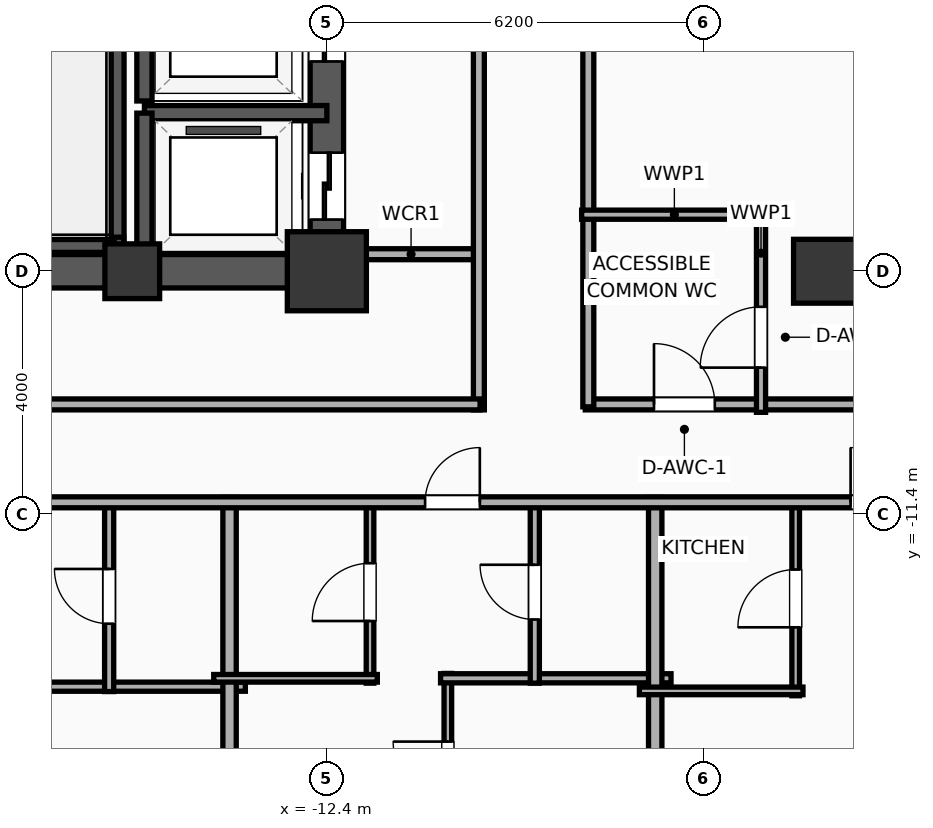
"""IFC4 building model, lengths in metres.
Left out: names, types, materials, properties, quantities, classifications, styles, units other than length and angle.
Written with IfcOpenShell. Run it as: python <this file> out.ifc"""

import sys

from ifc_helpers import new_model, si_unit, direction, frame, frame_2d, origin, origin_2d, place, context, subcontext, project, spatial, rectangle, extrude, element, fill, save


model = new_model("IFC4")
c1 = context("Model", 3, precision=1e-05, world=origin(), true_north=direction((0.0, 1.0)))
c2 = subcontext(c1, "Body", "Model", "MODEL_VIEW")
j1 = project(units=[si_unit("LENGTHUNIT", "METRE"), si_unit("PLANEANGLEUNIT", "RADIAN")], contexts=[c1])
p1 = place(None, origin())
s1 = spatial("IfcSite", under=j1, at=p1, CompositionType="ELEMENT")
p2 = place(p1, origin())
s2 = spatial("IfcBuilding", under=s1, at=p2, CompositionType="ELEMENT")
p3 = place(p2, frame((0.0, 0.0, 120.9)))
s3 = spatial("IfcBuildingStorey", under=s2, at=p3, CompositionType="ELEMENT", Elevation=120.9)
p4 = place(p3, frame((-15.6, -7.4, 0.0), z_axis=(0.0, 0.0, 1.0), x_axis=(1.0, 0.0, 0.0)))
e1 = element("IfcColumn", 1, at=p4, inside=s3, PredefinedType="COLUMN", context=c2, shape_type="SweptSolid", body=[
    extrude(rectangle(XDim=0.9, YDim=0.9, at=origin_2d()), origin(), (0.0, 0.0, 1.0), 3.9),
])
p5 = place(p3, frame((-12.4, -7.4, 0.0), z_axis=(0.0, 0.0, 1.0), x_axis=(1.0, 0.0, 0.0)))
e2 = element("IfcColumn", 2, at=p5, inside=s3, PredefinedType="COLUMN", context=c2, shape_type="SweptSolid", body=[
    extrude(rectangle(XDim=1.3, YDim=1.3, at=origin_2d()), origin(), (0.0, 0.0, 1.0), 3.9),
])
p6 = place(p3, frame((-19.475, -7.4, 0.0), z_axis=(0.0, 0.0, 1.0), x_axis=(1.0, 0.0, 0.0)))
e3 = element("IfcWall", 3, at=p6, inside=s3, PredefinedType="SHEAR", context=c2, shape_type="SweptSolid", body=[
    extrude(rectangle(XDim=7.35, YDim=0.55, at=frame_2d((3.675, 0.0))), origin(), (0.0, 0.0, 1.0), 3.65),
])
p7 = place(p3, frame((-12.4, -7.4, 0.0), z_axis=(0.0, 0.0, 1.0), x_axis=(0.0, 1.0, 0.0)))
e4 = element("IfcWall", 4, at=p7, inside=s3, PredefinedType="SHEAR", context=c2, shape_type="SweptSolid", body=[
    extrude(rectangle(XDim=14.8, YDim=0.55, at=frame_2d((7.4, 0.0))), origin(), (0.0, 0.0, 1.0), 3.65),
])
p8 = place(p7, frame((0.85, 0.0, 0.0)))
e5 = element("IfcOpeningElement", 5, at=p8, cuts=e4, PredefinedType="OPENING", context=c2, shape_type="SweptSolid", body=[
    extrude(rectangle(XDim=1.1, YDim=2.05, at=frame_2d((0.55, 1.025))), frame((0.0, 0.285, 0.0), z_axis=(0.0, -1.0, 0.0), x_axis=(1.0, 0.0, 0.0)), (0.0, 0.0, 1.0), 0.57),
])
p9 = place(p7, frame((3.45, 0.0, 0.0)))
e6 = element("IfcOpeningElement", 6, at=p9, cuts=e4, PredefinedType="OPENING", context=c2, shape_type="SweptSolid", body=[
    extrude(rectangle(XDim=1.1, YDim=2.05, at=frame_2d((0.55, 1.025))), frame((0.0, 0.285, 0.0), z_axis=(0.0, -1.0, 0.0), x_axis=(1.0, 0.0, 0.0)), (0.0, 0.0, 1.0), 0.57),
])
p10 = place(p7, frame((10.53, 0.0, 0.0)))
e7 = element("IfcOpeningElement", 7, at=p10, cuts=e4, PredefinedType="OPENING", context=c2, shape_type="SweptSolid", body=[
    extrude(rectangle(XDim=1.1, YDim=2.05, at=frame_2d((0.55, 1.025))), frame((0.0, 0.285, 0.0), z_axis=(0.0, -1.0, 0.0), x_axis=(1.0, 0.0, 0.0)), (0.0, 0.0, 1.0), 0.57),
])
p11 = place(p3, frame((-15.86, -7.085, 0.0), z_axis=(0.0, 0.0, 1.0), x_axis=(0.0, 1.0, 0.0)))
e8 = element("IfcWall", 8, at=p11, inside=s3, PredefinedType="SOLIDWALL", context=c2, shape_type="SweptSolid", body=[
    extrude(rectangle(XDim=7.685, YDim=0.25, at=frame_2d((3.843, 0.0))), origin(), (0.0, 0.0, 1.0), 3.65),
])
p12 = place(p3, frame((-19.2, -6.965, 0.0), z_axis=(0.0, 0.0, 1.0), x_axis=(1.0, 0.0, 0.0)))
e9 = element("IfcWall", 9, at=p12, inside=s3, PredefinedType="SOLIDWALL", context=c2, shape_type="SweptSolid", body=[
    extrude(rectangle(XDim=3.46, YDim=0.25, at=frame_2d((1.73, 0.0))), origin(), (0.0, 0.0, 1.0), 3.65),
])
p13 = place(p3, frame((-4.2, -7.4, 0.0), z_axis=(0.0, 0.0, 1.0), x_axis=(1.0, 0.0, 0.0)))
e10 = element("IfcColumn", 10, at=p13, inside=s3, PredefinedType="COLUMN", context=c2, shape_type="SweptSolid", body=[
    extrude(rectangle(XDim=1.05, YDim=1.05, at=origin_2d()), origin(), (0.0, 0.0, 1.0), 3.9),
])
p14 = place(p3, frame((-12.4, -4.8, 0.0), z_axis=(0.0, 0.0, 1.0), x_axis=(-1.0, 0.0, 0.0)))
e11 = element("IfcWall", 11, at=p14, inside=s3, PredefinedType="SOLIDWALL", context=c2, shape_type="SweptSolid", body=[
    extrude(rectangle(XDim=3.0, YDim=0.25, at=frame_2d((1.5, 0.0))), origin(), (0.0, 0.0, 1.0), 3.65),
])
p15 = place(p3, frame((-15.4, -4.8, 0.0), z_axis=(0.0, 0.0, 1.0), x_axis=(0.0, -1.0, 0.0)))
e12 = element("IfcWall", 12, at=p15, inside=s3, PredefinedType="SOLIDWALL", context=c2, shape_type="SweptSolid", body=[
    extrude(rectangle(XDim=2.6, YDim=0.25, at=frame_2d((1.3, 0.0))), origin(), (0.0, 0.0, 1.0), 3.65),
])
p16 = place(p3, frame((-15.4, -2.2, 0.0), z_axis=(0.0, 0.0, 1.0), x_axis=(0.0, -1.0, 0.0)))
e13 = element("IfcWall", 13, at=p16, inside=s3, PredefinedType="SOLIDWALL", context=c2, shape_type="SweptSolid", body=[
    extrude(rectangle(XDim=2.4, YDim=0.25, at=frame_2d((1.2, 0.0))), origin(), (0.0, 0.0, 1.0), 3.65),
])
p17 = place(p3, frame((-12.15, -7.12, 0.0), z_axis=(0.0, 0.0, 1.0), x_axis=(1.0, 0.0, 0.0)))
e14 = element("IfcWall", 14, at=p17, inside=s3, PredefinedType="PARTITIONING", context=c2, shape_type="SweptSolid", body=[
    extrude(rectangle(XDim=2.27, YDim=0.18, at=frame_2d((1.135, 0.0))), origin(), (0.0, 0.0, 1.0), 3.65),
])
p18 = place(p3, frame((-9.9, -9.68, 0.0), z_axis=(0.0, 0.0, 1.0), x_axis=(0.0, 1.0, 0.0)))
e15 = element("IfcWall", 15, at=p18, inside=s3, PredefinedType="PARTITIONING", context=c2, shape_type="SweptSolid", body=[
    extrude(rectangle(XDim=19.36, YDim=0.18, at=frame_2d((9.68, 0.0))), origin(), (0.0, 0.0, 1.0), 3.65),
])
p19 = place(p18, frame((8.162, 0.0, 0.0)))
e16 = element("IfcOpeningElement", 16, at=p19, cuts=e15, PredefinedType="OPENING", context=c2, shape_type="SweptSolid", body=[
    extrude(rectangle(XDim=1.1, YDim=2.05, at=frame_2d((0.55, 1.025))), frame((0.0, 0.1, 0.0), z_axis=(0.0, -1.0, 0.0), x_axis=(1.0, 0.0, 0.0)), (0.0, 0.0, 1.0), 0.2),
])
p20 = place(p3, frame((-29.21, -9.59, 0.0), z_axis=(0.0, 0.0, 1.0), x_axis=(1.0, 0.0, 0.0)))
e17 = element("IfcWall", 17, at=p20, inside=s3, PredefinedType="PARTITIONING", context=c2, shape_type="SweptSolid", body=[
    extrude(rectangle(XDim=19.33, YDim=0.18, at=frame_2d((9.665, 0.0))), origin(), (0.0, 0.0, 1.0), 3.65),
])
p21 = place(p3, frame((-8.15, -9.59, 0.0), z_axis=(0.0, 0.0, 1.0), x_axis=(1.0, 0.0, 0.0)))
e18 = element("IfcWall", 18, at=p21, inside=s3, PredefinedType="PARTITIONING", context=c2, shape_type="SweptSolid", body=[
    extrude(rectangle(XDim=16.3, YDim=0.18, at=frame_2d((8.15, 0.0))), origin(), (0.0, 0.0, 1.0), 3.65),
])
p22 = place(p21, frame((1.13, 0.0, 0.0)))
e19 = element("IfcOpeningElement", 19, at=p22, cuts=e18, PredefinedType="OPENING", context=c2, shape_type="SweptSolid", body=[
    extrude(rectangle(XDim=1.0, YDim=2.05, at=frame_2d((0.5, 1.025))), frame((0.0, 0.1, 0.0), z_axis=(0.0, -1.0, 0.0), x_axis=(1.0, 0.0, 0.0)), (0.0, 0.0, 1.0), 0.2),
])
p23 = place(p21, frame((10.12, 0.0, 0.0)))
e20 = element("IfcOpeningElement", 20, at=p23, cuts=e18, PredefinedType="OPENING", context=c2, shape_type="SweptSolid", body=[
    extrude(rectangle(XDim=0.95, YDim=2.05, at=frame_2d((0.475, 1.025))), frame((0.0, 0.1, 0.0), z_axis=(0.0, -1.0, 0.0), x_axis=(1.0, 0.0, 0.0)), (0.0, 0.0, 1.0), 0.2),
])
p24 = place(p3, frame((-8.1, -9.63, 0.0), z_axis=(0.0, 0.0, 1.0), x_axis=(0.0, 1.0, 0.0)))
e21 = element("IfcWall", 21, at=p24, inside=s3, PredefinedType="PARTITIONING", context=c2, shape_type="SweptSolid", body=[
    extrude(rectangle(XDim=19.26, YDim=0.18, at=frame_2d((9.63, 0.0))), origin(), (0.0, 0.0, 1.0), 3.65),
])
p25 = place(p3, frame((-5.26, -9.72, 0.0), z_axis=(0.0, 0.0, 1.0), x_axis=(0.0, 1.0, 0.0)))
e22 = element("IfcWall", 22, at=p25, inside=s3, PredefinedType="PLUMBINGWALL", context=c2, shape_type="SweptSolid", body=[
    extrude(rectangle(XDim=3.35, YDim=0.15, at=frame_2d((1.675, 0.0))), origin(), (0.0, 0.0, 1.0), 3.65),
])
p26 = place(p25, frame((0.735, 0.0, 0.0)))
e23 = element("IfcOpeningElement", 23, at=p26, cuts=e22, PredefinedType="OPENING", context=c2, shape_type="SweptSolid", body=[
    extrude(rectangle(XDim=1.0, YDim=2.05, at=frame_2d((0.5, 1.025))), frame((0.0, 0.085, 0.0), z_axis=(0.0, -1.0, 0.0), x_axis=(1.0, 0.0, 0.0)), (0.0, 0.0, 1.0), 0.17),
])
p27 = place(p3, frame((-8.21, -6.47, 0.0), z_axis=(0.0, 0.0, 1.0), x_axis=(1.0, 0.0, 0.0)))
e24 = element("IfcWall", 24, at=p27, inside=s3, PredefinedType="PLUMBINGWALL", context=c2, shape_type="SweptSolid", body=[
    extrude(rectangle(XDim=3.05, YDim=0.15, at=frame_2d((1.525, 0.0))), origin(), (0.0, 0.0, 1.0), 3.65),
])
p28 = place(p3, frame((-17.53, -14.232, 0.0), z_axis=(0.0, 0.0, 1.0), x_axis=(1.0, 0.0, 0.0)))
e25 = element("IfcWall", 25, at=p28, inside=s3, PredefinedType="PLUMBINGWALL", context=c2, shape_type="SweptSolid", body=[
    extrude(rectangle(XDim=3.79, YDim=0.15, at=frame_2d((1.895, 0.0))), origin(), (0.0, 0.0, 1.0), 3.65),
])
p29 = place(p3, frame((-15.98, -14.312, 0.0), z_axis=(0.0, 0.0, 1.0), x_axis=(0.0, 1.0, 0.0)))
e26 = element("IfcWall", 26, at=p29, inside=s3, PredefinedType="PLUMBINGWALL", context=c2, shape_type="SweptSolid", body=[
    extrude(rectangle(XDim=3.132, YDim=0.15, at=frame_2d((1.566, 0.0))), origin(), (0.0, 0.0, 1.0), 3.65),
])
p30 = place(p29, frame((1.116, 0.0, 0.0)))
e27 = element("IfcOpeningElement", 27, at=p30, cuts=e26, PredefinedType="OPENING", context=c2, shape_type="SweptSolid", body=[
    extrude(rectangle(XDim=0.9, YDim=2.05, at=frame_2d((0.45, 1.025))), frame((0.0, 0.085, 0.0), z_axis=(0.0, -1.0, 0.0), x_axis=(1.0, 0.0, 0.0)), (0.0, 0.0, 1.0), 0.17),
])
p31 = place(p3, frame((-14.0, -20.41, 0.0), z_axis=(0.0, 0.0, 1.0), x_axis=(0.0, 1.0, 0.0)))
e28 = element("IfcWall", 28, at=p31, inside=s3, PredefinedType="PARTITIONING", context=c2, shape_type="SweptSolid", body=[
    extrude(rectangle(XDim=9.29, YDim=0.22, at=frame_2d((4.645, 0.0))), origin(), (0.0, 0.0, 1.0), 3.65),
])
p32 = place(p3, frame((-10.41, -20.56, 0.0), z_axis=(0.0, 0.0, 1.0), x_axis=(0.0, 1.0, 0.0)))
e29 = element("IfcWall", 29, at=p32, inside=s3, PredefinedType="PARTITIONING", context=c2, shape_type="SweptSolid", body=[
    extrude(rectangle(XDim=6.546, YDim=0.125, at=frame_2d((3.273, 0.0))), origin(), (0.0, 0.0, 1.0), 3.65),
])
p33 = place(p32, frame((4.525, 0.0, 0.0)))
e30 = element("IfcOpeningElement", 30, at=p33, cuts=e29, PredefinedType="OPENING", context=c2, shape_type="SweptSolid", body=[
    extrude(rectangle(XDim=0.9, YDim=2.05, at=frame_2d((0.45, 1.025))), frame((0.0, 0.073, 0.0), z_axis=(0.0, -1.0, 0.0), x_axis=(1.0, 0.0, 0.0)), (0.0, 0.0, 1.0), 0.145),
])
p34 = place(p3, frame((-10.53, -14.094, 0.0), z_axis=(0.0, 0.0, 1.0), x_axis=(1.0, 0.0, 0.0)))
e31 = element("IfcWall", 31, at=p34, inside=s3, PredefinedType="PLUMBINGWALL", context=c2, shape_type="SweptSolid", body=[
    extrude(rectangle(XDim=3.79, YDim=0.15, at=frame_2d((1.895, 0.0))), origin(), (0.0, 0.0, 1.0), 3.65),
])
p35 = place(p3, frame((-11.69, -14.174, 0.0), z_axis=(0.0, 0.0, 1.0), x_axis=(0.0, 1.0, 0.0)))
e32 = element("IfcWall", 32, at=p35, inside=s3, PredefinedType="PARTITIONING", context=c2, shape_type="SweptSolid", body=[
    extrude(rectangle(XDim=2.994, YDim=0.125, at=frame_2d((1.497, 0.0))), origin(), (0.0, 0.0, 1.0), 3.65),
])
p36 = place(p35, frame((1.022, 0.0, 0.0)))
e33 = element("IfcOpeningElement", 33, at=p36, cuts=e32, PredefinedType="OPENING", context=c2, shape_type="SweptSolid", body=[
    extrude(rectangle(XDim=0.95, YDim=2.05, at=frame_2d((0.475, 1.025))), frame((0.0, 0.073, 0.0), z_axis=(0.0, -1.0, 0.0), x_axis=(1.0, 0.0, 0.0)), (0.0, 0.0, 1.0), 0.145),
])
p37 = place(p3, frame((-14.26, -14.094, 0.0), z_axis=(0.0, 0.0, 1.0), x_axis=(1.0, 0.0, 0.0)))
e34 = element("IfcWall", 34, at=p37, inside=s3, PredefinedType="PARTITIONING", context=c2, shape_type="SweptSolid", body=[
    extrude(rectangle(XDim=2.69, YDim=0.125, at=frame_2d((1.345, 0.0))), origin(), (0.0, 0.0, 1.0), 3.65),
])
p38 = place(p3, frame((-8.98, -14.174, 0.0), z_axis=(0.0, 0.0, 1.0), x_axis=(0.0, 1.0, 0.0)))
e35 = element("IfcWall", 35, at=p38, inside=s3, PredefinedType="PLUMBINGWALL", context=c2, shape_type="SweptSolid", body=[
    extrude(rectangle(XDim=2.994, YDim=0.15, at=frame_2d((1.497, 0.0))), origin(), (0.0, 0.0, 1.0), 3.65),
])
p39 = place(p38, frame((1.047, 0.0, 0.0)))
e36 = element("IfcOpeningElement", 36, at=p39, cuts=e35, PredefinedType="OPENING", context=c2, shape_type="SweptSolid", body=[
    extrude(rectangle(XDim=0.9, YDim=2.05, at=frame_2d((0.45, 1.025))), frame((0.0, 0.085, 0.0), z_axis=(0.0, -1.0, 0.0), x_axis=(1.0, 0.0, 0.0)), (0.0, 0.0, 1.0), 0.17),
])
p40 = place(p3, frame((-7.0, -20.41, 0.0), z_axis=(0.0, 0.0, 1.0), x_axis=(0.0, 1.0, 0.0)))
e37 = element("IfcWall", 37, at=p40, inside=s3, PredefinedType="PARTITIONING", context=c2, shape_type="SweptSolid", body=[
    extrude(rectangle(XDim=9.29, YDim=0.22, at=frame_2d((4.645, 0.0))), origin(), (0.0, 0.0, 1.0), 3.65),
])
p41 = place(p3, frame((-4.69, -14.381, 0.0), z_axis=(0.0, 0.0, 1.0), x_axis=(0.0, 1.0, 0.0)))
e38 = element("IfcWall", 38, at=p41, inside=s3, PredefinedType="PARTITIONING", context=c2, shape_type="SweptSolid", body=[
    extrude(rectangle(XDim=3.201, YDim=0.125, at=frame_2d((1.601, 0.0))), origin(), (0.0, 0.0, 1.0), 3.65),
])
p42 = place(p41, frame((1.125, 0.0, 0.0)))
e39 = element("IfcOpeningElement", 39, at=p42, cuts=e38, PredefinedType="OPENING", context=c2, shape_type="SweptSolid", body=[
    extrude(rectangle(XDim=0.95, YDim=2.05, at=frame_2d((0.475, 1.025))), frame((0.0, 0.073, 0.0), z_axis=(0.0, -1.0, 0.0), x_axis=(1.0, 0.0, 0.0)), (0.0, 0.0, 1.0), 0.145),
])
p43 = place(p3, frame((-7.26, -14.301, 0.0), z_axis=(0.0, 0.0, 1.0), x_axis=(1.0, 0.0, 0.0)))
e40 = element("IfcWall", 40, at=p43, inside=s3, PredefinedType="PARTITIONING", context=c2, shape_type="SweptSolid", body=[
    extrude(rectangle(XDim=2.69, YDim=0.125, at=frame_2d((1.345, 0.0))), origin(), (0.0, 0.0, 1.0), 3.65),
])
p44 = place(p3, frame((-29.21, -11.2, 0.0), z_axis=(0.0, 0.0, 1.0), x_axis=(1.0, 0.0, 0.0)))
e41 = element("IfcWall", 41, at=p44, inside=s3, PredefinedType="PARTITIONING", context=c2, shape_type="SweptSolid", body=[
    extrude(rectangle(XDim=62.42, YDim=0.18, at=frame_2d((31.21, 0.0))), origin(), (0.0, 0.0, 1.0), 3.65),
])
p45 = place(p44, frame((3.357, 0.0, 0.0)))
e42 = element("IfcOpeningElement", 42, at=p45, cuts=e41, PredefinedType="OPENING", context=c2, shape_type="SweptSolid", body=[
    extrude(rectangle(XDim=1.15, YDim=2.05, at=frame_2d((0.575, 1.025))), frame((0.0, 0.1, 0.0), z_axis=(0.0, -1.0, 0.0), x_axis=(1.0, 0.0, 0.0)), (0.0, 0.0, 1.0), 0.2),
])
p46 = place(p44, frame((10.998, 0.0, 0.0)))
e43 = element("IfcOpeningElement", 43, at=p46, cuts=e41, PredefinedType="OPENING", context=c2, shape_type="SweptSolid", body=[
    extrude(rectangle(XDim=1.15, YDim=2.05, at=frame_2d((0.575, 1.025))), frame((0.0, 0.1, 0.0), z_axis=(0.0, -1.0, 0.0), x_axis=(1.0, 0.0, 0.0)), (0.0, 0.0, 1.0), 0.2),
])
p47 = place(p44, frame((18.426, 0.0, 0.0)))
e44 = element("IfcOpeningElement", 44, at=p47, cuts=e41, PredefinedType="OPENING", context=c2, shape_type="SweptSolid", body=[
    extrude(rectangle(XDim=0.9, YDim=2.05, at=frame_2d((0.45, 1.025))), frame((0.0, 0.1, 0.0), z_axis=(0.0, -1.0, 0.0), x_axis=(1.0, 0.0, 0.0)), (0.0, 0.0, 1.0), 0.2),
])
p48 = place(p44, frame((25.423, 0.0, 0.0)))
e45 = element("IfcOpeningElement", 45, at=p48, cuts=e41, PredefinedType="OPENING", context=c2, shape_type="SweptSolid", body=[
    extrude(rectangle(XDim=0.9, YDim=2.05, at=frame_2d((0.45, 1.025))), frame((0.0, 0.1, 0.0), z_axis=(0.0, -1.0, 0.0), x_axis=(1.0, 0.0, 0.0)), (0.0, 0.0, 1.0), 0.2),
])
p49 = place(p44, frame((32.427, 0.0, 0.0)))
e46 = element("IfcOpeningElement", 46, at=p49, cuts=e41, PredefinedType="OPENING", context=c2, shape_type="SweptSolid", body=[
    extrude(rectangle(XDim=0.9, YDim=2.05, at=frame_2d((0.45, 1.025))), frame((0.0, 0.1, 0.0), z_axis=(0.0, -1.0, 0.0), x_axis=(1.0, 0.0, 0.0)), (0.0, 0.0, 1.0), 0.2),
])
p50 = place(p44, frame((39.424, 0.0, 0.0)))
e47 = element("IfcOpeningElement", 47, at=p50, cuts=e41, PredefinedType="OPENING", context=c2, shape_type="SweptSolid", body=[
    extrude(rectangle(XDim=0.9, YDim=2.05, at=frame_2d((0.45, 1.025))), frame((0.0, 0.1, 0.0), z_axis=(0.0, -1.0, 0.0), x_axis=(1.0, 0.0, 0.0)), (0.0, 0.0, 1.0), 0.2),
])
p51 = place(p44, frame((46.09, 0.0, 0.0)))
e48 = element("IfcOpeningElement", 48, at=p51, cuts=e41, PredefinedType="OPENING", context=c2, shape_type="SweptSolid", body=[
    extrude(rectangle(XDim=0.9, YDim=2.05, at=frame_2d((0.45, 1.025))), frame((0.0, 0.1, 0.0), z_axis=(0.0, -1.0, 0.0), x_axis=(1.0, 0.0, 0.0)), (0.0, 0.0, 1.0), 0.2),
])
p52 = place(p44, frame((51.071, 0.0, 0.0)))
e49 = element("IfcOpeningElement", 49, at=p52, cuts=e41, PredefinedType="OPENING", context=c2, shape_type="SweptSolid", body=[
    extrude(rectangle(XDim=1.15, YDim=2.05, at=frame_2d((0.575, 1.025))), frame((0.0, 0.1, 0.0), z_axis=(0.0, -1.0, 0.0), x_axis=(1.0, 0.0, 0.0)), (0.0, 0.0, 1.0), 0.2),
])
p53 = place(p44, frame((58.93, 0.0, 0.0)))
e50 = element("IfcOpeningElement", 50, at=p53, cuts=e41, PredefinedType="OPENING", context=c2, shape_type="SweptSolid", body=[
    extrude(rectangle(XDim=0.9, YDim=2.05, at=frame_2d((0.45, 1.025))), frame((0.0, 0.1, 0.0), z_axis=(0.0, -1.0, 0.0), x_axis=(1.0, 0.0, 0.0)), (0.0, 0.0, 1.0), 0.2),
])
p54 = place(p8, origin())
e51 = element("IfcDoor", 51, at=p54, inside=s3, OperationType="SLIDING_TO_LEFT", PredefinedType="DOOR", context=c2, shape_type="SweptSolid", body=[
    extrude(rectangle(XDim=1.1, YDim=2.05, at=frame_2d((0.55, 1.025))), frame((0.0, 0.025, 0.0), z_axis=(0.0, -1.0, 0.0), x_axis=(1.0, 0.0, 0.0)), (0.0, 0.0, 1.0), 0.05),
])
fill(e5, e51)
p55 = place(p9, origin())
e52 = element("IfcDoor", 52, at=p55, inside=s3, OperationType="SLIDING_TO_LEFT", PredefinedType="DOOR", context=c2, shape_type="SweptSolid", body=[
    extrude(rectangle(XDim=1.1, YDim=2.05, at=frame_2d((0.55, 1.025))), frame((0.0, 0.025, 0.0), z_axis=(0.0, -1.0, 0.0), x_axis=(1.0, 0.0, 0.0)), (0.0, 0.0, 1.0), 0.05),
])
fill(e6, e52)
p56 = place(p22, origin())
e53 = element("IfcDoor", 53, at=p56, inside=s3, OperationType="SINGLE_SWING_LEFT", PredefinedType="DOOR", context=c2, shape_type="SweptSolid", body=[
    extrude(rectangle(XDim=1.0, YDim=2.05, at=frame_2d((0.5, 1.025))), frame((0.0, 0.025, 0.0), z_axis=(0.0, -1.0, 0.0), x_axis=(1.0, 0.0, 0.0)), (0.0, 0.0, 1.0), 0.05),
])
fill(e19, e53)
p57 = place(p26, origin())
e54 = element("IfcDoor", 54, at=p57, inside=s3, OperationType="SINGLE_SWING_LEFT", PredefinedType="DOOR", context=c2, shape_type="SweptSolid", body=[
    extrude(rectangle(XDim=1.0, YDim=2.05, at=frame_2d((0.5, 1.025))), frame((0.0, 0.025, 0.0), z_axis=(0.0, -1.0, 0.0), x_axis=(1.0, 0.0, 0.0)), (0.0, 0.0, 1.0), 0.05),
])
fill(e23, e54)
p58 = place(p30, origin())
e55 = element("IfcDoor", 55, at=p58, inside=s3, OperationType="SINGLE_SWING_RIGHT", PredefinedType="DOOR", context=c2, shape_type="SweptSolid", body=[
    extrude(rectangle(XDim=0.9, YDim=2.05, at=frame_2d((0.45, 1.025))), frame((0.0, 0.025, 0.0), z_axis=(0.0, -1.0, 0.0), x_axis=(1.0, 0.0, 0.0)), (0.0, 0.0, 1.0), 0.05),
])
fill(e27, e55)
p59 = place(p33, origin())
e56 = element("IfcDoor", 56, at=p59, inside=s3, OperationType="SINGLE_SWING_RIGHT", PredefinedType="DOOR", context=c2, shape_type="SweptSolid", body=[
    extrude(rectangle(XDim=0.9, YDim=2.05, at=frame_2d((0.45, 1.025))), frame((0.0, 0.025, 0.0), z_axis=(0.0, -1.0, 0.0), x_axis=(1.0, 0.0, 0.0)), (0.0, 0.0, 1.0), 0.05),
])
fill(e30, e56)
p60 = place(p36, origin())
e57 = element("IfcDoor", 57, at=p60, inside=s3, OperationType="SINGLE_SWING_LEFT", PredefinedType="DOOR", context=c2, shape_type="SweptSolid", body=[
    extrude(rectangle(XDim=0.95, YDim=2.05, at=frame_2d((0.475, 1.025))), frame((0.0, 0.025, 0.0), z_axis=(0.0, -1.0, 0.0), x_axis=(1.0, 0.0, 0.0)), (0.0, 0.0, 1.0), 0.05),
])
fill(e33, e57)
p61 = place(p39, origin())
e58 = element("IfcDoor", 58, at=p61, inside=s3, OperationType="SINGLE_SWING_RIGHT", PredefinedType="DOOR", context=c2, shape_type="SweptSolid", body=[
    extrude(rectangle(XDim=0.9, YDim=2.05, at=frame_2d((0.45, 1.025))), frame((0.0, 0.025, 0.0), z_axis=(0.0, -1.0, 0.0), x_axis=(1.0, 0.0, 0.0)), (0.0, 0.0, 1.0), 0.05),
])
fill(e36, e58)
p62 = place(p42, origin())
e59 = element("IfcDoor", 59, at=p62, inside=s3, OperationType="SINGLE_SWING_LEFT", PredefinedType="DOOR", context=c2, shape_type="SweptSolid", body=[
    extrude(rectangle(XDim=0.95, YDim=2.05, at=frame_2d((0.475, 1.025))), frame((0.0, 0.025, 0.0), z_axis=(0.0, -1.0, 0.0), x_axis=(1.0, 0.0, 0.0)), (0.0, 0.0, 1.0), 0.05),
])
fill(e39, e59)
p63 = place(p47, origin())
e60 = element("IfcDoor", 60, at=p63, inside=s3, OperationType="SINGLE_SWING_RIGHT", PredefinedType="DOOR", context=c2, shape_type="SweptSolid", body=[
    extrude(rectangle(XDim=0.9, YDim=2.05, at=frame_2d((0.45, 1.025))), frame((0.0, 0.025, 0.0), z_axis=(0.0, -1.0, 0.0), x_axis=(1.0, 0.0, 0.0)), (0.0, 0.0, 1.0), 0.05),
])
fill(e44, e60)
p64 = place(p48, origin())
e61 = element("IfcDoor", 61, at=p64, inside=s3, OperationType="SINGLE_SWING_LEFT", PredefinedType="DOOR", context=c2, shape_type="SweptSolid", body=[
    extrude(rectangle(XDim=0.9, YDim=2.05, at=frame_2d((0.45, 1.025))), frame((0.0, 0.025, 0.0), z_axis=(0.0, -1.0, 0.0), x_axis=(1.0, 0.0, 0.0)), (0.0, 0.0, 1.0), 0.05),
])
fill(e45, e61)
save(model, sys.argv[1])
